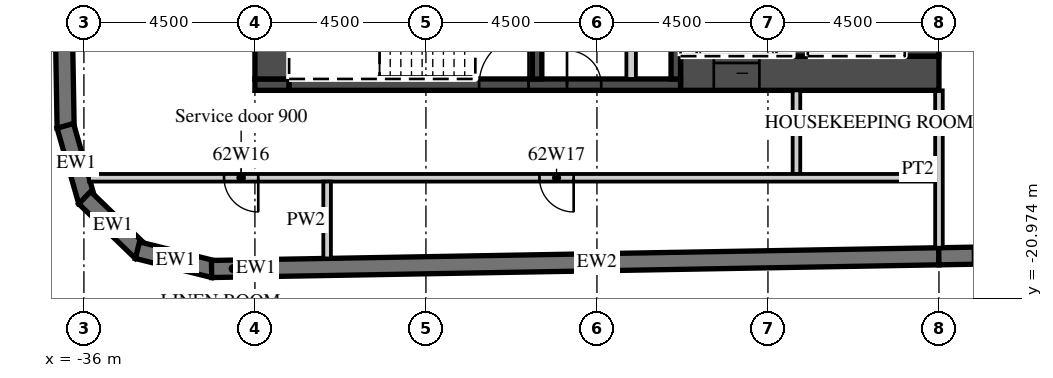
"""IFC4 building model, lengths in metres.
Left out: names, types, materials, properties, quantities, classifications, styles, units other than length and angle.
Written with IfcOpenShell. Run it as: python <this file> out.ifc"""

import sys

from ifc_helpers import new_model, si_unit, direction, frame, frame_2d, origin, place, context, subcontext, project, spatial, polyline, rectangle, outline, extrude, element, fill, save


model = new_model("IFC4")
c1 = context("Model", 3, precision=1e-05, world=origin(), true_north=direction((0.0, 1.0)))
c2 = subcontext(c1, "Body", "Model", "MODEL_VIEW")
j1 = project(units=[si_unit("LENGTHUNIT", "METRE"), si_unit("PLANEANGLEUNIT", "RADIAN")], contexts=[c1])
p1 = place(None, origin())
s1 = spatial("IfcSite", under=j1, at=p1, CompositionType="ELEMENT")
p2 = place(p1, origin())
s2 = spatial("IfcBuilding", under=s1, at=p2, CompositionType="ELEMENT")
p3 = place(p2, frame((0.0, 0.0, 250.7)))
s3 = spatial("IfcBuildingStorey", under=s2, at=p3, CompositionType="ELEMENT", Elevation=250.7)
p4 = place(p3, frame((-37.057, 16.503, 0.0), z_axis=(0.0, 0.0, 1.0), x_axis=(0.017452279857, -0.999847697366, 0.0)))
e1 = element("IfcWall", 1, at=p4, inside=s3, PredefinedType="SOLIDWALL", context=c2, shape_type="SweptSolid", body=[
    extrude(rectangle(XDim=33.0, YDim=0.45, at=frame_2d((16.5, 0.0))), origin(), (0.0, 0.0, 1.0), 3.02),
])
p5 = place(p3, frame((-36.49, -16.434, 0.0), z_axis=(0.0, 0.0, 1.0), x_axis=(0.275577603096, -0.961278827745, 0.0)))
e2 = element("IfcWall", 2, at=p5, inside=s3, PredefinedType="SOLIDWALL", context=c2, shape_type="SweptSolid", body=[
    extrude(outline(polyline([(0.0, -0.225), (2.071, -0.225), (1.95, 0.225), (0.121, 0.225), (0.0, -0.225)])), origin(), (0.0, 0.0, 1.0), 3.02),
])
p6 = place(p3, frame((-35.979, -18.324, 0.0), z_axis=(0.0, 0.0, 1.0), x_axis=(0.719320193998, -0.694678672846, 0.0)))
e3 = element("IfcWall", 3, at=p6, inside=s3, PredefinedType="SOLIDWALL", context=c2, shape_type="SweptSolid", body=[
    extrude(outline(polyline([(0.0, -0.225), (2.071, -0.225), (1.95, 0.225), (0.121, 0.225), (0.0, -0.225)])), origin(), (0.0, 0.0, 1.0), 3.02),
])
p7 = place(p3, frame((-34.591, -19.706, 0.0), z_axis=(0.0, 0.0, 1.0), x_axis=(0.970315655375, -0.241841950319, 0.0)))
e4 = element("IfcWall", 4, at=p7, inside=s3, PredefinedType="SOLIDWALL", context=c2, shape_type="SweptSolid", body=[
    extrude(outline(polyline([(0.0, -0.225), (2.071, -0.225), (1.95, 0.225), (0.121, 0.225), (0.0, -0.225)])), origin(), (0.0, 0.0, 1.0), 3.02),
])
p8 = place(p3, frame((-32.641, -20.2, 0.0), z_axis=(0.0, 0.0, 1.0), x_axis=(0.99984870815, 0.017394275206, 0.0)))
e5 = element("IfcWall", 5, at=p8, inside=s3, PredefinedType="SOLIDWALL", context=c2, shape_type="SweptSolid", body=[
    extrude(rectangle(XDim=1.137, YDim=0.45, at=frame_2d((0.568, 0.0))), origin(), (0.0, 0.0, 1.0), 3.02),
])
p9 = place(p3, frame((-31.504, -20.18, 0.0), z_axis=(0.0, 0.0, 1.0), x_axis=(0.999847677887, 0.017453395744, 0.0)))
e6 = element("IfcWall", 6, at=p9, inside=s3, PredefinedType="SOLIDWALL", context=c2, shape_type="SweptSolid", body=[
    extrude(rectangle(XDim=18.003, YDim=0.45, at=frame_2d((9.001, 0.0))), origin(), (0.0, 0.0, 1.0), 3.02),
])
p10 = place(p3, frame((-13.504, -19.866, 0.0), z_axis=(0.0, 0.0, 1.0), x_axis=(0.999847672978, 0.017453676992, 0.0)))
e7 = element("IfcWall", 7, at=p10, inside=s3, PredefinedType="SOLIDWALL", context=c2, shape_type="SweptSolid", body=[
    extrude(rectangle(XDim=52.86, YDim=0.45, at=frame_2d((26.43, 0.0))), origin(), (0.0, 0.0, 1.0), 3.02),
])
p11 = place(p10, frame((0.9, 0.0, 0.45)))
e8 = element("IfcOpeningElement", 8, at=p11, cuts=e7, PredefinedType="OPENING", context=c2, shape_type="SweptSolid", body=[
    extrude(rectangle(XDim=2.7, YDim=2.25, at=frame_2d((1.35, 1.125))), frame((0.0, 0.235, 0.0), z_axis=(0.0, -1.0, 0.0), x_axis=(1.0, 0.0, 0.0)), (0.0, 0.0, 1.0), 0.47),
])
p12 = place(p10, frame((5.401, 0.0, 0.45)))
e9 = element("IfcOpeningElement", 9, at=p12, cuts=e7, PredefinedType="OPENING", context=c2, shape_type="SweptSolid", body=[
    extrude(rectangle(XDim=2.7, YDim=2.25, at=frame_2d((1.35, 1.125))), frame((0.0, 0.235, 0.0), z_axis=(0.0, -1.0, 0.0), x_axis=(1.0, 0.0, 0.0)), (0.0, 0.0, 1.0), 0.47),
])
p13 = place(p10, frame((9.902, 0.0, 0.45)))
e10 = element("IfcOpeningElement", 10, at=p13, cuts=e7, PredefinedType="OPENING", context=c2, shape_type="SweptSolid", body=[
    extrude(rectangle(XDim=2.7, YDim=2.25, at=frame_2d((1.35, 1.125))), frame((0.0, 0.235, 0.0), z_axis=(0.0, -1.0, 0.0), x_axis=(1.0, 0.0, 0.0)), (0.0, 0.0, 1.0), 0.47),
])
p14 = place(p10, frame((14.402, 0.0, 0.45)))
e11 = element("IfcOpeningElement", 11, at=p14, cuts=e7, PredefinedType="OPENING", context=c2, shape_type="SweptSolid", body=[
    extrude(rectangle(XDim=2.7, YDim=2.25, at=frame_2d((1.35, 1.125))), frame((0.0, 0.235, 0.0), z_axis=(0.0, -1.0, 0.0), x_axis=(1.0, 0.0, 0.0)), (0.0, 0.0, 1.0), 0.47),
])
p15 = place(p10, frame((18.903, 0.0, 0.45)))
e12 = element("IfcOpeningElement", 12, at=p15, cuts=e7, PredefinedType="OPENING", context=c2, shape_type="SweptSolid", body=[
    extrude(rectangle(XDim=2.7, YDim=2.25, at=frame_2d((1.35, 1.125))), frame((0.0, 0.235, 0.0), z_axis=(0.0, -1.0, 0.0), x_axis=(1.0, 0.0, 0.0)), (0.0, 0.0, 1.0), 0.47),
])
p16 = place(p10, frame((23.404, 0.0, 0.45)))
e13 = element("IfcOpeningElement", 13, at=p16, cuts=e7, PredefinedType="OPENING", context=c2, shape_type="SweptSolid", body=[
    extrude(rectangle(XDim=2.7, YDim=2.25, at=frame_2d((1.35, 1.125))), frame((0.0, 0.235, 0.0), z_axis=(0.0, -1.0, 0.0), x_axis=(1.0, 0.0, 0.0)), (0.0, 0.0, 1.0), 0.47),
])
p17 = place(p10, frame((27.904, 0.0, 0.45)))
e14 = element("IfcOpeningElement", 14, at=p17, cuts=e7, PredefinedType="OPENING", context=c2, shape_type="SweptSolid", body=[
    extrude(rectangle(XDim=2.7, YDim=2.25, at=frame_2d((1.35, 1.125))), frame((0.0, 0.235, 0.0), z_axis=(0.0, -1.0, 0.0), x_axis=(1.0, 0.0, 0.0)), (0.0, 0.0, 1.0), 0.47),
])
p18 = place(p10, frame((32.405, 0.0, 0.45)))
e15 = element("IfcOpeningElement", 15, at=p18, cuts=e7, PredefinedType="OPENING", context=c2, shape_type="SweptSolid", body=[
    extrude(rectangle(XDim=2.7, YDim=2.25, at=frame_2d((1.35, 1.125))), frame((0.0, 0.235, 0.0), z_axis=(0.0, -1.0, 0.0), x_axis=(1.0, 0.0, 0.0)), (0.0, 0.0, 1.0), 0.47),
])
p19 = place(p10, frame((36.906, 0.0, 0.45)))
e16 = element("IfcOpeningElement", 16, at=p19, cuts=e7, PredefinedType="OPENING", context=c2, shape_type="SweptSolid", body=[
    extrude(rectangle(XDim=2.7, YDim=2.25, at=frame_2d((1.35, 1.125))), frame((0.0, 0.235, 0.0), z_axis=(0.0, -1.0, 0.0), x_axis=(1.0, 0.0, 0.0)), (0.0, 0.0, 1.0), 0.47),
])
p20 = place(p10, frame((41.406, 0.0, 0.45)))
e17 = element("IfcOpeningElement", 17, at=p20, cuts=e7, PredefinedType="OPENING", context=c2, shape_type="SweptSolid", body=[
    extrude(rectangle(XDim=2.7, YDim=2.25, at=frame_2d((1.35, 1.125))), frame((0.0, 0.235, 0.0), z_axis=(0.0, -1.0, 0.0), x_axis=(1.0, 0.0, 0.0)), (0.0, 0.0, 1.0), 0.47),
])
p21 = place(p10, frame((45.907, 0.0, 0.45)))
e18 = element("IfcOpeningElement", 18, at=p21, cuts=e7, PredefinedType="OPENING", context=c2, shape_type="SweptSolid", body=[
    extrude(rectangle(XDim=2.7, YDim=2.25, at=frame_2d((1.35, 1.125))), frame((0.0, 0.235, 0.0), z_axis=(0.0, -1.0, 0.0), x_axis=(1.0, 0.0, 0.0)), (0.0, 0.0, 1.0), 0.47),
])
p22 = place(p3, frame((-13.5, -19.641, 0.0), z_axis=(0.0, 0.0, 1.0), x_axis=(0.0, 1.0, 0.0)))
e19 = element("IfcWall", 19, at=p22, inside=s3, PredefinedType="PARTITIONING", context=c2, shape_type="SweptSolid", body=[
    extrude(rectangle(XDim=4.141, YDim=0.2, at=frame_2d((2.071, 0.0))), origin(), (0.0, 0.0, 1.0), 3.02),
])
p23 = place(p3, frame((-20.3, -15.05, 0.0), z_axis=(0.0, 0.0, 1.0), x_axis=(1.0, 0.0, 0.0)))
e20 = element("IfcWall", 20, at=p23, inside=s3, PredefinedType="SHEAR", context=c2, shape_type="SweptSolid", body=[
    extrude(rectangle(XDim=6.8, YDim=0.9, at=frame_2d((3.4, 0.0))), origin(), (0.0, 0.0, 1.0), 3.02),
])
p24 = place(p23, frame((0.875, 0.0, 0.0)))
e21 = element("IfcOpeningElement", 21, at=p24, cuts=e20, PredefinedType="OPENING", context=c2, shape_type="SweptSolid", body=[
    extrude(rectangle(XDim=1.2, YDim=2.1, at=frame_2d((0.6, 1.05))), frame((0.0, 0.46, 0.0), z_axis=(0.0, -1.0, 0.0), x_axis=(1.0, 0.0, 0.0)), (0.0, 0.0, 1.0), 0.92),
])
p25 = place(p3, frame((-31.5, -15.35, 0.0), z_axis=(0.0, 0.0, 1.0), x_axis=(1.0, 0.0, 0.0)))
e22 = element("IfcWall", 22, at=p25, inside=s3, PredefinedType="SHEAR", context=c2, shape_type="SweptSolid", body=[
    extrude(rectangle(XDim=0.9, YDim=0.3, at=frame_2d((0.45, 0.0))), origin(), (0.0, 0.0, 1.0), 3.02),
])
p26 = place(p3, frame((-30.6, -15.35, 0.0), z_axis=(0.0, 0.0, 1.0), x_axis=(1.0, 0.0, 0.0)))
e23 = element("IfcWall", 23, at=p26, inside=s3, PredefinedType="SHEAR", context=c2, shape_type="SweptSolid", body=[
    extrude(rectangle(XDim=10.3, YDim=0.3, at=frame_2d((5.15, 0.0))), origin(), (0.0, 0.0, 1.0), 3.02),
])
p27 = place(p26, frame((5.0, 0.0, 0.0)))
e24 = element("IfcOpeningElement", 24, at=p27, cuts=e23, PredefinedType="OPENING", context=c2, shape_type="SweptSolid", body=[
    extrude(rectangle(XDim=1.3, YDim=2.1, at=frame_2d((0.65, 1.05))), frame((0.0, 0.16, 0.0), z_axis=(0.0, -1.0, 0.0), x_axis=(1.0, 0.0, 0.0)), (0.0, 0.0, 1.0), 0.32),
])
p28 = place(p26, frame((7.312, 0.0, 0.0)))
e25 = element("IfcOpeningElement", 25, at=p28, cuts=e23, PredefinedType="OPENING", context=c2, shape_type="SweptSolid", body=[
    extrude(rectangle(XDim=0.9, YDim=2.1, at=frame_2d((0.45, 1.05))), frame((0.0, 0.16, 0.0), z_axis=(0.0, -1.0, 0.0), x_axis=(1.0, 0.0, 0.0)), (0.0, 0.0, 1.0), 0.32),
])
p29 = place(p3, frame((-31.05, -15.2, 0.0), z_axis=(0.0, 0.0, 1.0), x_axis=(0.0, 1.0, 0.0)))
e26 = element("IfcWall", 26, at=p29, inside=s3, PredefinedType="SHEAR", context=c2, shape_type="SweptSolid", body=[
    extrude(rectangle(XDim=12.8, YDim=0.9, at=frame_2d((6.4, 0.0))), origin(), (0.0, 0.0, 1.0), 3.02),
])
p30 = place(p29, frame((11.5, 0.0, 0.0)))
e27 = element("IfcOpeningElement", 27, at=p30, cuts=e26, PredefinedType="OPENING", context=c2, shape_type="SweptSolid", body=[
    extrude(rectangle(XDim=1.1, YDim=2.1, at=frame_2d((0.55, 1.05))), frame((0.0, 0.46, 0.0), z_axis=(0.0, -1.0, 0.0), x_axis=(1.0, 0.0, 0.0)), (0.0, 0.0, 1.0), 0.92),
])
p31 = place(p3, frame((-13.95, -14.6, 0.0), z_axis=(0.0, 0.0, 1.0), x_axis=(0.0, 1.0, 0.0)))
e28 = element("IfcWall", 28, at=p31, inside=s3, PredefinedType="SHEAR", context=c2, shape_type="SweptSolid", body=[
    extrude(rectangle(XDim=12.2, YDim=0.9, at=frame_2d((6.1, 0.0))), origin(), (0.0, 0.0, 1.0), 3.02),
])
p32 = place(p3, frame((-17.15, -14.6, 0.0), z_axis=(0.0, 0.0, 1.0), x_axis=(0.0, 1.0, 0.0)))
e29 = element("IfcWall", 29, at=p32, inside=s3, PredefinedType="SHEAR", context=c2, shape_type="SweptSolid", body=[
    extrude(rectangle(XDim=5.8, YDim=0.4, at=frame_2d((2.9, 0.0))), origin(), (0.0, 0.0, 1.0), 3.02),
])
for number, where, z_axis, x_axis in (
    (30, (-20.425, -15.2, 0.0), (0.0, 0.0, 1.0), (0.0, 1.0, 0.0)),
    (31, (-24.075, -15.2, 0.0), (0.0, 0.0, 1.0), (0.0, 1.0, 0.0)),
):
    element("IfcWall", number, at=place(p3, frame(where, z_axis=z_axis, x_axis=x_axis)), inside=s3, PredefinedType="SHEAR", context=c2, shape_type="SweptSolid", body=[
        extrude(rectangle(XDim=3.25, YDim=0.25, at=frame_2d((1.625, 0.0))), origin(), (0.0, 0.0, 1.0), 3.02),
    ])
p33 = place(p3, frame((-21.6, -15.2, 0.0), z_axis=(0.0, 0.0, 1.0), x_axis=(0.0, 1.0, 0.0)))
e32 = element("IfcWall", 32, at=p33, inside=s3, PredefinedType="PARTITIONING", context=c2, shape_type="SweptSolid", body=[
    extrude(rectangle(XDim=3.25, YDim=0.25, at=frame_2d((1.625, 0.0))), origin(), (0.0, 0.0, 1.0), 3.02),
])
p34 = place(p3, frame((-17.25, -17.7, 0.0), z_axis=(0.0, 0.0, 1.0), x_axis=(0.0, 1.0, 0.0)))
e33 = element("IfcWall", 33, at=p34, inside=s3, PredefinedType="PARTITIONING", context=c2, shape_type="SweptSolid", body=[
    extrude(rectangle(XDim=2.2, YDim=0.2, at=frame_2d((1.1, 0.0))), origin(), (0.0, 0.0, 1.0), 3.02),
])
p35 = place(p3, frame((-35.864, -17.8, 0.0), z_axis=(0.0, 0.0, 1.0), x_axis=(1.0, 0.0, 0.0)))
e34 = element("IfcWall", 34, at=p35, inside=s3, PredefinedType="PARTITIONING", context=c2, shape_type="SweptSolid", body=[
    extrude(rectangle(XDim=22.264, YDim=0.2, at=frame_2d((11.132, 0.0))), origin(), (0.0, 0.0, 1.0), 3.02),
])
p36 = place(p35, frame((3.551, 0.0, 0.0)))
e35 = element("IfcOpeningElement", 35, at=p36, cuts=e34, PredefinedType="OPENING", context=c2, shape_type="SweptSolid", body=[
    extrude(rectangle(XDim=0.9, YDim=2.1, at=frame_2d((0.45, 1.05))), frame((0.0, 0.11, 0.0), z_axis=(0.0, -1.0, 0.0), x_axis=(1.0, 0.0, 0.0)), (0.0, 0.0, 1.0), 0.22),
])
p37 = place(p35, frame((11.851, 0.0, 0.0)))
e36 = element("IfcOpeningElement", 36, at=p37, cuts=e34, PredefinedType="OPENING", context=c2, shape_type="SweptSolid", body=[
    extrude(rectangle(XDim=0.9, YDim=2.1, at=frame_2d((0.45, 1.05))), frame((0.0, 0.11, 0.0), z_axis=(0.0, -1.0, 0.0), x_axis=(1.0, 0.0, 0.0)), (0.0, 0.0, 1.0), 0.22),
])
p38 = place(p3, frame((-29.6, -19.922, 0.0), z_axis=(0.0, 0.0, 1.0), x_axis=(0.0, 1.0, 0.0)))
e37 = element("IfcWall", 37, at=p38, inside=s3, PredefinedType="PARTITIONING", context=c2, shape_type="SweptSolid", body=[
    extrude(rectangle(XDim=2.022, YDim=0.2, at=frame_2d((1.011, 0.0))), origin(), (0.0, 0.0, 1.0), 3.02),
])
p39 = place(p11, origin())
e38 = element("IfcWindow", 38, at=p39, inside=s3, PartitioningType="SINGLE_PANEL", PredefinedType="WINDOW", context=c2, shape_type="SweptSolid", body=[
    extrude(rectangle(XDim=2.7, YDim=2.25, at=frame_2d((1.35, 1.125))), frame((0.0, 0.09, 0.0), z_axis=(0.0, -1.0, 0.0), x_axis=(1.0, 0.0, 0.0)), (0.0, 0.0, 1.0), 0.06),
])
fill(e8, e38)
p40 = place(p24, origin())
e39 = element("IfcDoor", 39, at=p40, inside=s3, OperationType="SLIDING_TO_LEFT", PredefinedType="DOOR", context=c2, shape_type="SweptSolid", body=[
    extrude(rectangle(XDim=1.2, YDim=2.1, at=frame_2d((0.6, 1.05))), frame((0.0, 0.025, 0.0), z_axis=(0.0, -1.0, 0.0), x_axis=(1.0, 0.0, 0.0)), (0.0, 0.0, 1.0), 0.05),
])
fill(e21, e39)
p41 = place(p27, origin())
e40 = element("IfcDoor", 40, at=p41, inside=s3, OperationType="SINGLE_SWING_RIGHT", PredefinedType="DOOR", context=c2, shape_type="SweptSolid", body=[
    extrude(rectangle(XDim=1.3, YDim=2.1, at=frame_2d((0.65, 1.05))), frame((0.0, 0.025, 0.0), z_axis=(0.0, -1.0, 0.0), x_axis=(1.0, 0.0, 0.0)), (0.0, 0.0, 1.0), 0.05),
])
fill(e24, e40)
p42 = place(p28, origin())
e41 = element("IfcDoor", 41, at=p42, inside=s3, OperationType="SINGLE_SWING_LEFT", PredefinedType="DOOR", context=c2, shape_type="SweptSolid", body=[
    extrude(rectangle(XDim=0.9, YDim=2.1, at=frame_2d((0.45, 1.05))), frame((0.0, 0.025, 0.0), z_axis=(0.0, -1.0, 0.0), x_axis=(1.0, 0.0, 0.0)), (0.0, 0.0, 1.0), 0.05),
])
fill(e25, e41)
p43 = place(p36, origin())
e42 = element("IfcDoor", 42, at=p43, inside=s3, OperationType="SINGLE_SWING_RIGHT", PredefinedType="DOOR", context=c2, shape_type="SweptSolid", body=[
    extrude(rectangle(XDim=0.9, YDim=2.1, at=frame_2d((0.45, 1.05))), frame((0.0, 0.025, 0.0), z_axis=(0.0, -1.0, 0.0), x_axis=(1.0, 0.0, 0.0)), (0.0, 0.0, 1.0), 0.05),
])
fill(e35, e42)
p44 = place(p37, origin())
e43 = element("IfcDoor", 43, at=p44, inside=s3, OperationType="SINGLE_SWING_RIGHT", PredefinedType="DOOR", context=c2, shape_type="SweptSolid", body=[
    extrude(rectangle(XDim=0.9, YDim=2.1, at=frame_2d((0.45, 1.05))), frame((0.0, 0.025, 0.0), z_axis=(0.0, -1.0, 0.0), x_axis=(1.0, 0.0, 0.0)), (0.0, 0.0, 1.0), 0.05),
])
fill(e36, e43)
save(model, sys.argv[1])
